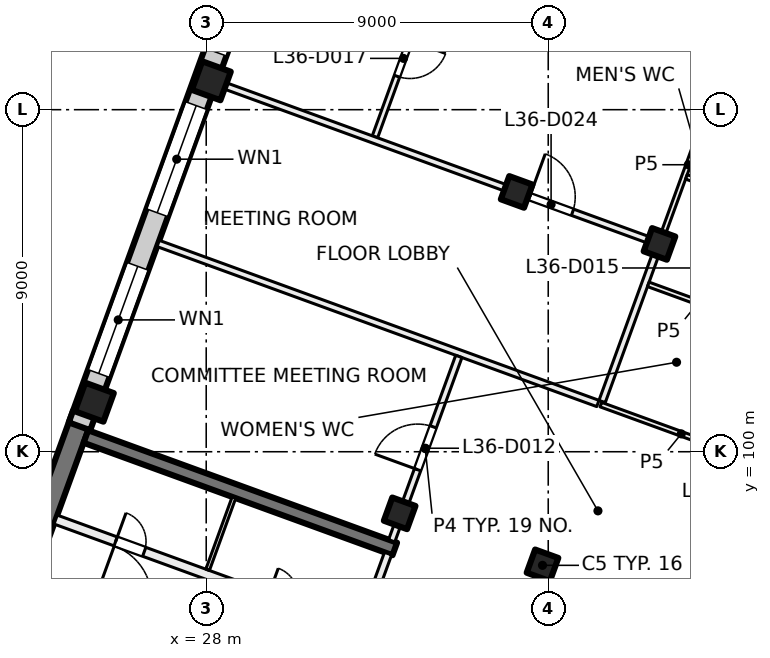
"""IFC4 building model, lengths in metres.
Left out: names, types, materials, properties, quantities, classifications, styles, units other than length and angle.
Written with IfcOpenShell. Run it as: python <this file> out.ifc"""

import sys

from ifc_helpers import new_model, si_unit, direction, frame, frame_2d, origin, origin_2d, place, context, subcontext, project, spatial, rectangle, extrude, element, fill, save


model = new_model("IFC4")
c1 = context("Model", 3, precision=1e-05, world=origin(), true_north=direction((0.0, 1.0)))
c2 = subcontext(c1, "Body", "Model", "MODEL_VIEW")
j1 = project(units=[si_unit("LENGTHUNIT", "METRE"), si_unit("PLANEANGLEUNIT", "RADIAN")], contexts=[c1])
p1 = place(None, origin())
s1 = spatial("IfcSite", under=j1, at=p1, CompositionType="ELEMENT")
p2 = place(p1, origin())
s2 = spatial("IfcBuilding", under=s1, at=p2, CompositionType="ELEMENT")
p3 = place(p2, frame((0.0, 0.0, 154.5)))
s3 = spatial("IfcBuildingStorey", under=s2, at=p3, CompositionType="ELEMENT", Elevation=154.5)
for number, where, z_axis, x_axis in (
    (1, (39.927, 105.468, 0.0), (0.0, 0.0, 1.0), (-0.342, -0.94, 0.0)),
    (2, (36.849, 97.011, 0.0), (0.0, 0.0, 1.0), (-0.342, -0.94, 0.0)),
    (3, (36.169, 106.836, 0.0), (0.0, 0.0, 1.0), (-0.342, -0.94, 0.0)),
    (4, (33.091, 98.379, 0.0), (0.0, 0.0, 1.0), (-0.342, -0.94, 0.0)),
):
    element("IfcColumn", number, at=place(p3, frame(where, z_axis=z_axis, x_axis=x_axis)), inside=s3, PredefinedType="COLUMN", context=c2, shape_type="SweptSolid", body=[
        extrude(rectangle(XDim=0.65, YDim=0.65, at=origin_2d()), origin(), (0.0, 0.0, 1.0), 4.0),
    ])
for number, where, z_axis, x_axis in (
    (5, (28.134, 109.76, 0.0), (0.0, 0.0, 1.0), (-0.342, -0.94, 0.0)),
    (6, (25.056, 101.303, 0.0), (0.0, 0.0, 1.0), (-0.342, -0.94, 0.0)),
):
    element("IfcColumn", number, at=place(p3, frame(where, z_axis=z_axis, x_axis=x_axis)), inside=s3, PredefinedType="COLUMN", context=c2, shape_type="SweptSolid", body=[
        extrude(rectangle(XDim=0.8, YDim=0.8, at=origin_2d()), origin(), (0.0, 0.0, 1.0), 4.0),
    ])
p4 = place(p3, frame((21.694, 92.577, 0.0), z_axis=(0.0, 0.0, 1.0), x_axis=(0.342010253184, 0.939696220444, 0.0)))
e7 = element("IfcWall", 7, at=p4, inside=s3, PredefinedType="SHEAR", context=c2, shape_type="SweptSolid", body=[
    extrude(rectangle(XDim=8.95, YDim=0.55, at=frame_2d((4.475, 0.0))), origin(), (0.0, 0.0, 1.0), 4.0),
])
p5 = place(p3, frame((32.962, 97.441, 0.0), z_axis=(0.0, 0.0, 1.0), x_axis=(-0.939689545667, 0.342028592028, 0.0)))
e8 = element("IfcWall", 8, at=p5, inside=s3, PredefinedType="SHEAR", context=c2, shape_type="SweptSolid", body=[
    extrude(rectangle(XDim=8.65, YDim=0.35, at=frame_2d((4.325, 0.0))), origin(), (0.0, 0.0, 1.0), 4.0),
])
p6 = place(p3, frame((24.666, 100.669, 0.0), z_axis=(0.0, 0.0, 1.0), x_axis=(0.34201964167, 0.939692803373, 0.0)))
e9 = element("IfcWall", 9, at=p6, inside=s3, PredefinedType="SOLIDWALL", context=c2, shape_type="SweptSolid", body=[
    extrude(rectangle(XDim=32.884, YDim=0.6, at=frame_2d((16.442, 0.0))), origin(), (0.0, 0.0, 1.0), 3.625),
])
p7 = place(p6, frame((1.48, 0.0, 0.9)))
e10 = element("IfcOpeningElement", 10, at=p7, cuts=e9, PredefinedType="OPENING", context=c2, shape_type="SweptSolid", body=[
    extrude(rectangle(XDim=3.0, YDim=2.4, at=frame_2d((1.5, 1.2))), frame((0.0, 0.31, 0.0), z_axis=(0.0, -1.0, 0.0), x_axis=(1.0, 0.0, 0.0)), (0.0, 0.0, 1.0), 0.62),
])
p8 = place(p6, frame((5.98, 0.0, 0.9)))
e11 = element("IfcOpeningElement", 11, at=p8, cuts=e9, PredefinedType="OPENING", context=c2, shape_type="SweptSolid", body=[
    extrude(rectangle(XDim=3.0, YDim=2.4, at=frame_2d((1.5, 1.2))), frame((0.0, 0.31, 0.0), z_axis=(0.0, -1.0, 0.0), x_axis=(1.0, 0.0, 0.0)), (0.0, 0.0, 1.0), 0.62),
])
p9 = place(p6, frame((10.48, 0.0, 0.9)))
e12 = element("IfcOpeningElement", 12, at=p9, cuts=e9, PredefinedType="OPENING", context=c2, shape_type="SweptSolid", body=[
    extrude(rectangle(XDim=3.0, YDim=2.4, at=frame_2d((1.5, 1.2))), frame((0.0, 0.31, 0.0), z_axis=(0.0, -1.0, 0.0), x_axis=(1.0, 0.0, 0.0)), (0.0, 0.0, 1.0), 0.62),
])
p10 = place(p6, frame((14.98, 0.0, 0.9)))
e13 = element("IfcOpeningElement", 13, at=p10, cuts=e9, PredefinedType="OPENING", context=c2, shape_type="SweptSolid", body=[
    extrude(rectangle(XDim=3.0, YDim=2.4, at=frame_2d((1.5, 1.2))), frame((0.0, 0.31, 0.0), z_axis=(0.0, -1.0, 0.0), x_axis=(1.0, 0.0, 0.0)), (0.0, 0.0, 1.0), 0.62),
])
p11 = place(p6, frame((20.08, 0.0, 0.0)))
e14 = element("IfcOpeningElement", 14, at=p11, cuts=e9, PredefinedType="OPENING", context=c2, shape_type="SweptSolid", body=[
    extrude(rectangle(XDim=1.8, YDim=2.4, at=frame_2d((0.9, 1.2))), frame((0.0, 0.31, 0.0), z_axis=(0.0, -1.0, 0.0), x_axis=(1.0, 0.0, 0.0)), (0.0, 0.0, 1.0), 0.62),
])
p12 = place(p6, frame((23.98, 0.0, 0.9)))
e15 = element("IfcOpeningElement", 15, at=p12, cuts=e9, PredefinedType="OPENING", context=c2, shape_type="SweptSolid", body=[
    extrude(rectangle(XDim=3.0, YDim=2.4, at=frame_2d((1.5, 1.2))), frame((0.0, 0.31, 0.0), z_axis=(0.0, -1.0, 0.0), x_axis=(1.0, 0.0, 0.0)), (0.0, 0.0, 1.0), 0.62),
])
p13 = place(p6, frame((28.48, 0.0, 0.9)))
e16 = element("IfcOpeningElement", 16, at=p13, cuts=e9, PredefinedType="OPENING", context=c2, shape_type="SweptSolid", body=[
    extrude(rectangle(XDim=3.0, YDim=2.4, at=frame_2d((1.5, 1.2))), frame((0.0, 0.31, 0.0), z_axis=(0.0, -1.0, 0.0), x_axis=(1.0, 0.0, 0.0)), (0.0, 0.0, 1.0), 0.62),
])
p14 = place(p3, frame((31.459, 93.678, 0.0), z_axis=(0.0, 0.0, 1.0), x_axis=(0.341985870128, 0.939705094502, 0.0)))
e17 = element("IfcWall", 17, at=p14, inside=s3, PredefinedType="PARTITIONING", context=c2, shape_type="SweptSolid", body=[
    extrude(rectangle(XDim=3.875, YDim=0.2, at=frame_2d((1.938, 0.0))), origin(), (0.0, 0.0, 1.0), 3.625),
])
p15 = place(p14, frame((0.3, 0.0, 0.0)))
e18 = element("IfcOpeningElement", 18, at=p15, cuts=e17, PredefinedType="OPENING", context=c2, shape_type="SweptSolid", body=[
    extrude(rectangle(XDim=1.2, YDim=2.1, at=frame_2d((0.6, 1.05))), frame((0.0, 0.11, 0.0), z_axis=(0.0, -1.0, 0.0), x_axis=(1.0, 0.0, 0.0)), (0.0, 0.0, 1.0), 0.22),
])
p16 = place(p3, frame((23.483, 96.688, 0.0), z_axis=(0.0, 0.0, 1.0), x_axis=(0.939691007314, -0.342024576271, 0.0)))
e19 = element("IfcWall", 19, at=p16, inside=s3, PredefinedType="PARTITIONING", context=c2, shape_type="SweptSolid", body=[
    extrude(rectangle(XDim=8.425, YDim=0.2, at=frame_2d((4.212, 0.0))), origin(), (0.0, 0.0, 1.0), 3.625),
])
p17 = place(p16, frame((1.688, 0.0, 0.0)))
e20 = element("IfcOpeningElement", 20, at=p17, cuts=e19, PredefinedType="OPENING", context=c2, shape_type="SweptSolid", body=[
    extrude(rectangle(XDim=1.5, YDim=2.1, at=frame_2d((0.75, 1.05))), frame((0.0, 0.11, 0.0), z_axis=(0.0, -1.0, 0.0), x_axis=(1.0, 0.0, 0.0)), (0.0, 0.0, 1.0), 0.22),
])
p18 = place(p3, frame((24.039, 98.215, 0.0), z_axis=(0.0, 0.0, 1.0), x_axis=(0.939687617333, -0.342033889887, 0.0)))
e21 = element("IfcWall", 21, at=p18, inside=s3, PredefinedType="PARTITIONING", context=c2, shape_type="SweptSolid", body=[
    extrude(rectangle(XDim=8.425, YDim=0.25, at=frame_2d((4.212, 0.0))), origin(), (0.0, 0.0, 1.0), 3.625),
])
p19 = place(p18, frame((5.942, 0.0, 0.0)))
e22 = element("IfcOpeningElement", 22, at=p19, cuts=e21, PredefinedType="OPENING", context=c2, shape_type="SweptSolid", body=[
    extrude(rectangle(XDim=0.8, YDim=2.1, at=frame_2d((0.4, 1.05))), frame((0.0, 0.135, 0.0), z_axis=(0.0, -1.0, 0.0), x_axis=(1.0, 0.0, 0.0)), (0.0, 0.0, 1.0), 0.27),
])
p20 = place(p18, frame((1.68, 0.0, 0.0)))
e23 = element("IfcOpeningElement", 23, at=p20, cuts=e21, PredefinedType="OPENING", context=c2, shape_type="SweptSolid", body=[
    extrude(rectangle(XDim=0.8, YDim=2.1, at=frame_2d((0.4, 1.05))), frame((0.0, 0.135, 0.0), z_axis=(0.0, -1.0, 0.0), x_axis=(1.0, 0.0, 0.0)), (0.0, 0.0, 1.0), 0.27),
])
p21 = place(p3, frame((28.037, 96.893, 0.0), z_axis=(0.0, 0.0, 1.0), x_axis=(0.342043138314, 0.939684250976, 0.0)))
e24 = element("IfcWall", 24, at=p21, inside=s3, PredefinedType="PARTITIONING", context=c2, shape_type="SweptSolid", body=[
    extrude(rectangle(XDim=2.025, YDim=0.1, at=frame_2d((1.012, 0.0))), origin(), (0.0, 0.0, 1.0), 3.625),
])
p22 = place(p3, frame((26.736, 105.48, 0.0), z_axis=(0.0, 0.0, 1.0), x_axis=(0.939721611154, -0.341940482438, 0.0)))
e25 = element("IfcWall", 25, at=p22, inside=s3, PredefinedType="PARTITIONING", context=c2, shape_type="SweptSolid", body=[
    extrude(rectangle(XDim=12.312, YDim=0.175, at=frame_2d((6.156, 0.0))), origin(), (0.0, 0.0, 1.0), 3.625),
])
p23 = place(p3, frame((37.053, 120.96, 0.0), z_axis=(0.0, 0.0, 1.0), x_axis=(-0.342023551531, -0.939691380293, 0.0)))
e26 = element("IfcWall", 26, at=p23, inside=s3, PredefinedType="PARTITIONING", context=c2, shape_type="SweptSolid", body=[
    extrude(rectangle(XDim=13.488, YDim=0.15, at=frame_2d((6.744, 0.0))), origin(), (0.0, 0.0, 1.0), 3.625),
])
p24 = place(p23, frame((10.791, 0.0, 0.0)))
e27 = element("IfcOpeningElement", 27, at=p24, cuts=e26, PredefinedType="OPENING", context=c2, shape_type="SweptSolid", body=[
    extrude(rectangle(XDim=1.0, YDim=2.1, at=frame_2d((0.5, 1.05))), frame((0.0, 0.085, 0.0), z_axis=(0.0, -1.0, 0.0), x_axis=(1.0, 0.0, 0.0)), (0.0, 0.0, 1.0), 0.17),
])
p25 = place(p23, frame((6.324, 0.0, 0.0)))
e28 = element("IfcOpeningElement", 28, at=p25, cuts=e26, PredefinedType="OPENING", context=c2, shape_type="SweptSolid", body=[
    extrude(rectangle(XDim=1.0, YDim=2.1, at=frame_2d((0.5, 1.05))), frame((0.0, 0.085, 0.0), z_axis=(0.0, -1.0, 0.0), x_axis=(1.0, 0.0, 0.0)), (0.0, 0.0, 1.0), 0.17),
])
p26 = place(p23, frame((1.824, 0.0, 0.0)))
e29 = element("IfcOpeningElement", 29, at=p26, cuts=e26, PredefinedType="OPENING", context=c2, shape_type="SweptSolid", body=[
    extrude(rectangle(XDim=1.0, YDim=2.1, at=frame_2d((0.5, 1.05))), frame((0.0, 0.085, 0.0), z_axis=(0.0, -1.0, 0.0), x_axis=(1.0, 0.0, 0.0)), (0.0, 0.0, 1.0), 0.17),
])
p27 = place(p3, frame((32.881, 97.657, 0.0), z_axis=(0.0, 0.0, 1.0), x_axis=(0.342058204353, 0.939678766832, 0.0)))
e30 = element("IfcWall", 30, at=p27, inside=s3, PredefinedType="PARTITIONING", context=c2, shape_type="SweptSolid", body=[
    extrude(rectangle(XDim=5.163, YDim=0.175, at=frame_2d((2.581, 0.0))), origin(), (0.0, 0.0, 1.0), 3.625),
])
p28 = place(p27, frame((1.991, 0.0, 0.0)))
e31 = element("IfcOpeningElement", 31, at=p28, cuts=e30, PredefinedType="OPENING", context=c2, shape_type="SweptSolid", body=[
    extrude(rectangle(XDim=1.2, YDim=2.1, at=frame_2d((0.6, 1.05))), frame((0.0, 0.097, 0.0), z_axis=(0.0, -1.0, 0.0), x_axis=(1.0, 0.0, 0.0)), (0.0, 0.0, 1.0), 0.195),
])
p29 = place(p3, frame((38.385, 101.24, 0.0), z_axis=(0.0, 0.0, 1.0), x_axis=(0.939711088937, -0.341969398235, 0.0)))
e32 = element("IfcWall", 32, at=p29, inside=s3, PredefinedType="PARTITIONING", context=c2, shape_type="SweptSolid", body=[
    extrude(rectangle(XDim=4.503, YDim=0.125, at=frame_2d((2.252, 0.0))), origin(), (0.0, 0.0, 1.0), 3.625),
])
p30 = place(p3, frame((38.418, 101.322, 0.0), z_axis=(0.0, 0.0, 1.0), x_axis=(0.341987815327, 0.939704386585, 0.0)))
e33 = element("IfcWall", 33, at=p30, inside=s3, PredefinedType="PARTITIONING", context=c2, shape_type="SweptSolid", body=[
    extrude(rectangle(XDim=4.325, YDim=0.175, at=frame_2d((2.162, 0.0))), origin(), (0.0, 0.0, 1.0), 3.625),
])
p31 = place(p3, frame((39.926, 105.465, 0.0), z_axis=(0.0, 0.0, 1.0), x_axis=(0.342263852659, 0.93960388205, 0.0)))
e34 = element("IfcWall", 34, at=p31, inside=s3, PredefinedType="PARTITIONING", context=c2, shape_type="SweptSolid", body=[
    extrude(rectangle(XDim=4.441, YDim=0.125, at=frame_2d((2.221, 0.0))), origin(), (0.0, 0.0, 1.0), 3.625),
])
p32 = place(p3, frame((28.275, 109.709, 0.0), z_axis=(0.0, 0.0, 1.0), x_axis=(0.939698441386, -0.342004150936, 0.0)))
e35 = element("IfcWall", 35, at=p32, inside=s3, PredefinedType="PARTITIONING", context=c2, shape_type="SweptSolid", body=[
    extrude(rectangle(XDim=12.312, YDim=0.175, at=frame_2d((6.156, 0.0))), origin(), (0.0, 0.0, 1.0), 3.625),
])
p33 = place(p32, frame((8.765, 0.0, 0.0)))
e36 = element("IfcOpeningElement", 36, at=p33, cuts=e35, PredefinedType="OPENING", context=c2, shape_type="SweptSolid", body=[
    extrude(rectangle(XDim=1.2, YDim=2.1, at=frame_2d((0.6, 1.05))), frame((0.0, 0.097, 0.0), z_axis=(0.0, -1.0, 0.0), x_axis=(1.0, 0.0, 0.0)), (0.0, 0.0, 1.0), 0.195),
])
p34 = place(p3, frame((42.264, 103.446, 0.0), z_axis=(0.0, 0.0, 1.0), x_axis=(-0.939640574808, 0.342163104635, 0.0)))
e37 = element("IfcWall", 37, at=p34, inside=s3, PredefinedType="PARTITIONING", context=c2, shape_type="SweptSolid", body=[
    extrude(rectangle(XDim=2.8, YDim=0.125, at=frame_2d((1.4, 0.0))), origin(), (0.0, 0.0, 1.0), 3.625),
])
p35 = place(p3, frame((43.29, 106.266, 0.0), z_axis=(0.0, 0.0, 1.0), x_axis=(-0.939601484935, 0.342270433294, 0.0)))
e38 = element("IfcWall", 38, at=p35, inside=s3, PredefinedType="PARTITIONING", context=c2, shape_type="SweptSolid", body=[
    extrude(rectangle(XDim=2.825, YDim=0.125, at=frame_2d((1.412, 0.0))), origin(), (0.0, 0.0, 1.0), 3.625),
])
p36 = place(p7, origin())
e39 = element("IfcWindow", 39, at=p36, inside=s3, PartitioningType="SINGLE_PANEL", PredefinedType="WINDOW", context=c2, shape_type="SweptSolid", body=[
    extrude(rectangle(XDim=3.0, YDim=2.4, at=frame_2d((1.5, 1.2))), frame((0.0, 0.03, 0.0), z_axis=(0.0, -1.0, 0.0), x_axis=(1.0, 0.0, 0.0)), (0.0, 0.0, 1.0), 0.06),
])
fill(e10, e39)
p37 = place(p8, origin())
e40 = element("IfcWindow", 40, at=p37, inside=s3, PartitioningType="SINGLE_PANEL", PredefinedType="WINDOW", context=c2, shape_type="SweptSolid", body=[
    extrude(rectangle(XDim=3.0, YDim=2.4, at=frame_2d((1.5, 1.2))), frame((0.0, 0.03, 0.0), z_axis=(0.0, -1.0, 0.0), x_axis=(1.0, 0.0, 0.0)), (0.0, 0.0, 1.0), 0.06),
])
fill(e11, e40)
p38 = place(p9, origin())
e41 = element("IfcWindow", 41, at=p38, inside=s3, PartitioningType="SINGLE_PANEL", PredefinedType="WINDOW", context=c2, shape_type="SweptSolid", body=[
    extrude(rectangle(XDim=3.0, YDim=2.4, at=frame_2d((1.5, 1.2))), frame((0.0, 0.03, 0.0), z_axis=(0.0, -1.0, 0.0), x_axis=(1.0, 0.0, 0.0)), (0.0, 0.0, 1.0), 0.06),
])
fill(e12, e41)
p39 = place(p20, origin())
e42 = element("IfcDoor", 42, at=p39, inside=s3, OperationType="SINGLE_SWING_RIGHT", PredefinedType="DOOR", context=c2, shape_type="SweptSolid", body=[
    extrude(rectangle(XDim=0.8, YDim=2.1, at=frame_2d((0.4, 1.05))), frame((0.0, 0.025, 0.0), z_axis=(0.0, -1.0, 0.0), x_axis=(1.0, 0.0, 0.0)), (0.0, 0.0, 1.0), 0.05),
])
fill(e23, e42)
p40 = place(p28, origin())
e43 = element("IfcDoor", 43, at=p40, inside=s3, OperationType="DOUBLE_DOOR_SINGLE_SWING", PredefinedType="DOOR", context=c2, shape_type="SweptSolid", body=[
    extrude(rectangle(XDim=1.2, YDim=2.1, at=frame_2d((0.6, 1.05))), frame((0.0, 0.025, 0.0), z_axis=(0.0, -1.0, 0.0), x_axis=(1.0, 0.0, 0.0)), (0.0, 0.0, 1.0), 0.05),
])
fill(e31, e43)
p41 = place(p24, origin())
e44 = element("IfcDoor", 44, at=p41, inside=s3, OperationType="SINGLE_SWING_LEFT", PredefinedType="DOOR", context=c2, shape_type="SweptSolid", body=[
    extrude(rectangle(XDim=1.0, YDim=2.1, at=frame_2d((0.5, 1.05))), frame((0.0, 0.025, 0.0), z_axis=(0.0, -1.0, 0.0), x_axis=(1.0, 0.0, 0.0)), (0.0, 0.0, 1.0), 0.05),
])
fill(e27, e44)
p42 = place(p33, origin())
e45 = element("IfcDoor", 45, at=p42, inside=s3, OperationType="DOUBLE_DOOR_SINGLE_SWING", PredefinedType="DOOR", context=c2, shape_type="SweptSolid", body=[
    extrude(rectangle(XDim=1.2, YDim=2.1, at=frame_2d((0.6, 1.05))), frame((0.0, 0.025, 0.0), z_axis=(0.0, -1.0, 0.0), x_axis=(1.0, 0.0, 0.0)), (0.0, 0.0, 1.0), 0.05),
])
fill(e36, e45)
save(model, sys.argv[1])
